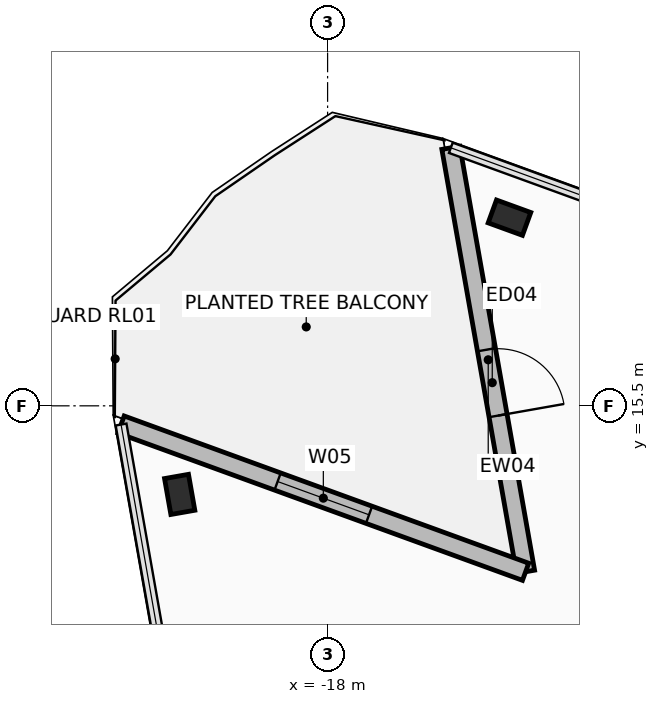
"""IFC4 building model, lengths in metres.
Left out: names, types, materials, properties, quantities, classifications, styles, units other than length and angle.
Written with IfcOpenShell. Run it as: python <this file> out.ifc"""

import sys

from ifc_helpers import new_model, si_unit, direction, frame, frame_2d, origin, origin_2d, place, context, subcontext, project, spatial, rectangle, hollow_rectangle, extrude, element, fill, save


model = new_model("IFC4")
c1 = context("Model", 3, precision=1e-05, world=origin(), true_north=direction((0.0, 1.0)))
c2 = subcontext(c1, "Body", "Model", "MODEL_VIEW")
j1 = project(units=[si_unit("LENGTHUNIT", "METRE"), si_unit("PLANEANGLEUNIT", "RADIAN")], contexts=[c1])
p1 = place(None, origin())
s1 = spatial("IfcSite", under=j1, at=p1, CompositionType="ELEMENT")
p2 = place(p1, origin())
s2 = spatial("IfcBuilding", under=s1, at=p2, CompositionType="ELEMENT")
p3 = place(p2, frame((0.0, 0.0, 184.9)))
s3 = spatial("IfcBuildingStorey", under=s2, at=p3, CompositionType="ELEMENT", Elevation=184.9)
for number, where, z_axis, x_axis in (
    (1, (-20.433, 14.043, 0.0), (0.0, 0.0, 1.0), (-0.174, 0.985, 0.0)),
    (2, (-15.009, 18.594, 0.0), (0.0, 0.0, 1.0), (-0.94, 0.342, 0.0)),
):
    element("IfcColumn", number, at=place(p3, frame(where, z_axis=z_axis, x_axis=x_axis)), inside=s3, PredefinedType="COLUMN", context=c2, shape_type="SweptSolid", body=[
        extrude(hollow_rectangle(XDim=0.4, YDim=0.6, WallThickness=0.03, at=origin_2d()), origin(), (0.0, 0.0, 1.0), 3.6),
    ])
p4 = place(p3, frame((-15.973, 19.743, 0.0), z_axis=(0.0, 0.0, 1.0), x_axis=(0.173651569749, -0.984807154891, 0.0)))
e3 = element("IfcWall", 3, at=p4, inside=s3, PredefinedType="STANDARD", context=c2, shape_type="SweptSolid", body=[
    extrude(rectangle(XDim=7.08, YDim=0.3, at=frame_2d((3.54, 0.0))), origin(), (0.0, 0.0, 1.0), 2.715),
])
p5 = place(p4, frame((3.372, 0.0, 0.0)))
e4 = element("IfcOpeningElement", 4, at=p5, cuts=e3, PredefinedType="OPENING", context=c2, shape_type="SweptSolid", body=[
    extrude(rectangle(XDim=1.1, YDim=2.2, at=frame_2d((0.55, 1.1))), frame((0.0, 0.16, 0.0), z_axis=(0.0, -1.0, 0.0), x_axis=(1.0, 0.0, 0.0)), (0.0, 0.0, 1.0), 0.32),
])
p6 = place(p3, frame((-14.744, 12.771, 0.0), z_axis=(0.0, 0.0, 1.0), x_axis=(-0.939687665182, 0.342033758429, 0.0)))
e5 = element("IfcWall", 5, at=p6, inside=s3, PredefinedType="STANDARD", context=c2, shape_type="SweptSolid", body=[
    extrude(rectangle(XDim=7.08, YDim=0.3, at=frame_2d((3.54, 0.0))), origin(), (0.0, 0.0, 1.0), 2.715),
])
p7 = place(p6, frame((2.74, 0.0, 0.335)))
e6 = element("IfcOpeningElement", 6, at=p7, cuts=e5, PredefinedType="OPENING", context=c2, shape_type="SweptSolid", body=[
    extrude(rectangle(XDim=1.6, YDim=2.2, at=frame_2d((0.8, 1.1))), frame((0.0, 0.16, 0.0), z_axis=(0.0, -1.0, 0.0), x_axis=(1.0, 0.0, 0.0)), (0.0, 0.0, 1.0), 0.32),
])
p8 = place(p5, frame((1.1, 0.0, 0.0), z_axis=(0.0, 0.0, 1.0), x_axis=(-1.0, 0.0, 0.0)))
e7 = element("IfcDoor", 7, at=p8, inside=s3, OperationType="SINGLE_SWING_LEFT", PredefinedType="DOOR", context=c2, shape_type="SweptSolid", body=[
    extrude(rectangle(XDim=1.1, YDim=2.2, at=frame_2d((0.55, 1.1))), frame((0.0, 0.025, 0.0), z_axis=(0.0, -1.0, 0.0), x_axis=(1.0, 0.0, 0.0)), (0.0, 0.0, 1.0), 0.05),
])
fill(e4, e7)
p9 = place(p7, origin())
e8 = element("IfcWindow", 8, at=p9, inside=s3, PartitioningType="SINGLE_PANEL", PredefinedType="WINDOW", context=c2, shape_type="SweptSolid", body=[
    extrude(rectangle(XDim=1.6, YDim=2.2, at=frame_2d((0.8, 1.1))), frame((0.0, 0.03, 0.0), z_axis=(0.0, -1.0, 0.0), x_axis=(1.0, 0.0, 0.0)), (0.0, 0.0, 1.0), 0.06),
])
fill(e6, e8)
save(model, sys.argv[1])
